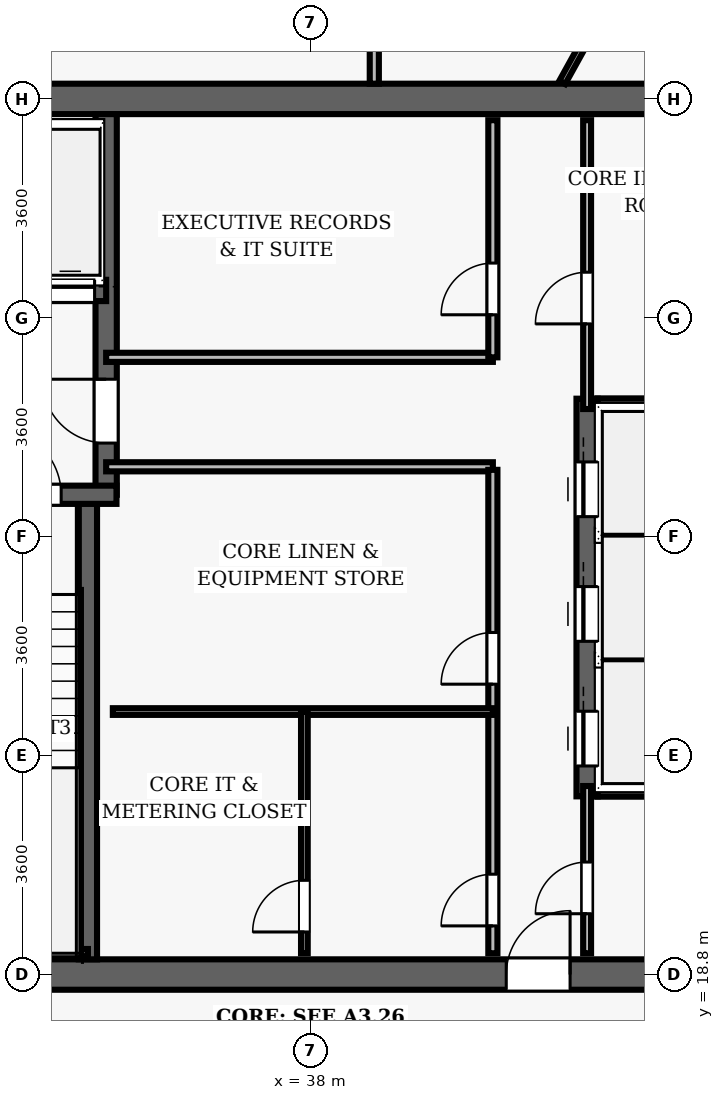
"""IFC4 building model, lengths in metres.
Left out: names, types, materials, properties, quantities, classifications, styles, units other than length and angle.
Written with IfcOpenShell. Run it as: python <this file> out.ifc"""

import sys

from ifc_helpers import new_model, si_unit, direction, frame, frame_2d, origin, place, context, subcontext, project, spatial, rectangle, extrude, element, fill, save


model = new_model("IFC4")
c1 = context("Model", 3, precision=1e-05, world=origin(), true_north=direction((0.0, 1.0)))
c2 = subcontext(c1, "Body", "Model", "MODEL_VIEW")
j1 = project(units=[si_unit("LENGTHUNIT", "METRE"), si_unit("PLANEANGLEUNIT", "RADIAN")], contexts=[c1])
p1 = place(None, origin())
s1 = spatial("IfcSite", under=j1, at=p1, CompositionType="ELEMENT")
p2 = place(p1, origin())
s2 = spatial("IfcBuilding", under=s1, at=p2, CompositionType="ELEMENT")
p3 = place(p2, frame((0.0, 0.0, 261.3)))
s3 = spatial("IfcBuildingStorey", under=s2, at=p3, CompositionType="ELEMENT", Elevation=261.3)
p4 = place(p3, frame((26.75, 18.8, 0.0), z_axis=(0.0, 0.0, 1.0), x_axis=(1.0, 0.0, 0.0)))
e1 = element("IfcWall", 1, at=p4, inside=s3, PredefinedType="SHEAR", context=c2, shape_type="SweptSolid", body=[
    extrude(rectangle(XDim=22.5, YDim=0.5, at=frame_2d((11.25, 0.0))), origin(), (0.0, 0.0, 1.0), 3.85),
])
p5 = place(p4, frame((14.47, 0.0, 0.0)))
e2 = element("IfcOpeningElement", 2, at=p5, cuts=e1, PredefinedType="OPENING", context=c2, shape_type="SweptSolid", body=[
    extrude(rectangle(XDim=1.05, YDim=2.15, at=frame_2d((0.525, 1.075))), frame((0.0, 0.26, 0.0), z_axis=(0.0, -1.0, 0.0), x_axis=(1.0, 0.0, 0.0)), (0.0, 0.0, 1.0), 0.52),
])
p6 = place(p3, frame((26.75, 33.2, 0.0), z_axis=(0.0, 0.0, 1.0), x_axis=(1.0, 0.0, 0.0)))
e3 = element("IfcWall", 3, at=p6, inside=s3, PredefinedType="SHEAR", context=c2, shape_type="SweptSolid", body=[
    extrude(rectangle(XDim=22.5, YDim=0.5, at=frame_2d((11.25, 0.0))), origin(), (0.0, 0.0, 1.0), 3.85),
])
p7 = place(p3, frame((34.34, 19.05, 0.0), z_axis=(0.0, 0.0, 1.0), x_axis=(0.0, 1.0, 0.0)))
e4 = element("IfcWall", 4, at=p7, inside=s3, PredefinedType="SHEAR", context=c2, shape_type="SweptSolid", body=[
    extrude(rectangle(XDim=7.5, YDim=0.3, at=frame_2d((3.75, 0.0))), origin(), (0.0, 0.0, 1.0), 3.85),
])
p8 = place(p3, frame((34.64, 26.69, 0.0), z_axis=(0.0, 0.0, 1.0), x_axis=(0.0, 1.0, 0.0)))
e5 = element("IfcWall", 5, at=p8, inside=s3, PredefinedType="SHEAR", context=c2, shape_type="SweptSolid", body=[
    extrude(rectangle(XDim=6.26, YDim=0.35, at=frame_2d((3.13, 0.0))), origin(), (0.0, 0.0, 1.0), 3.85),
])
p9 = place(p8, frame((0.85, 0.0, 0.0)))
e6 = element("IfcOpeningElement", 6, at=p9, cuts=e5, PredefinedType="OPENING", context=c2, shape_type="SweptSolid", body=[
    extrude(rectangle(XDim=1.05, YDim=2.15, at=frame_2d((0.525, 1.075))), frame((0.0, 0.185, 0.0), z_axis=(0.0, -1.0, 0.0), x_axis=(1.0, 0.0, 0.0)), (0.0, 0.0, 1.0), 0.37),
])
p10 = place(p3, frame((31.25, 26.69, 0.0), z_axis=(0.0, 0.0, 1.0), x_axis=(1.0, 0.0, 0.0)))
e7 = element("IfcWall", 7, at=p10, inside=s3, PredefinedType="SHEAR", context=c2, shape_type="SweptSolid", body=[
    extrude(rectangle(XDim=3.56, YDim=0.3, at=frame_2d((1.78, 0.0))), origin(), (0.0, 0.0, 1.0), 3.85),
])
p11 = place(p10, frame((1.55, 0.0, 0.0)))
e8 = element("IfcOpeningElement", 8, at=p11, cuts=e7, PredefinedType="OPENING", context=c2, shape_type="SweptSolid", body=[
    extrude(rectangle(XDim=1.1, YDim=2.15, at=frame_2d((0.55, 1.075))), frame((0.0, 0.16, 0.0), z_axis=(0.0, -1.0, 0.0), x_axis=(1.0, 0.0, 0.0)), (0.0, 0.0, 1.0), 0.32),
])
p12 = place(p3, frame((31.3, 19.16, 0.0), z_axis=(0.0, 0.0, 1.0), x_axis=(1.0, 0.0, 0.0)))
e9 = element("IfcWall", 9, at=p12, inside=s3, PredefinedType="SHEAR", context=c2, shape_type="SweptSolid", body=[
    extrude(rectangle(XDim=3.04, YDim=0.12, at=frame_2d((1.52, 0.0))), origin(), (0.0, 0.0, 1.0), 3.85),
])
p13 = place(p3, frame((32.23, 30.05, 0.0), z_axis=(0.0, 0.0, 1.0), x_axis=(1.0, 0.0, 0.0)))
e10 = element("IfcWall", 10, at=p13, inside=s3, PredefinedType="SHEAR", context=c2, shape_type="SweptSolid", body=[
    extrude(rectangle(XDim=2.41, YDim=0.35, at=frame_2d((1.205, 0.0))), origin(), (0.0, 0.0, 1.0), 3.04),
])
p14 = place(p13, frame((0.42, 0.0, 0.0)))
e11 = element("IfcOpeningElement", 11, at=p14, cuts=e10, PredefinedType="OPENING", context=c2, shape_type="SweptSolid", body=[
    extrude(rectangle(XDim=0.8, YDim=2.15, at=frame_2d((0.4, 1.075))), frame((0.0, 0.185, 0.0), z_axis=(0.0, -1.0, 0.0), x_axis=(1.0, 0.0, 0.0)), (0.0, 0.0, 1.0), 0.37),
])
p15 = place(p13, frame((1.42, 0.0, 0.0)))
e12 = element("IfcOpeningElement", 12, at=p15, cuts=e10, PredefinedType="OPENING", context=c2, shape_type="SweptSolid", body=[
    extrude(rectangle(XDim=0.8, YDim=2.15, at=frame_2d((0.4, 1.075))), frame((0.0, 0.185, 0.0), z_axis=(0.0, -1.0, 0.0), x_axis=(1.0, 0.0, 0.0)), (0.0, 0.0, 1.0), 0.37),
])
p16 = place(p3, frame((42.55, 21.73, 0.0), z_axis=(0.0, 0.0, 1.0), x_axis=(0.0, 1.0, 0.0)))
e13 = element("IfcWall", 13, at=p16, inside=s3, PredefinedType="SHEAR", context=c2, shape_type="SweptSolid", body=[
    extrude(rectangle(XDim=6.54, YDim=0.35, at=frame_2d((3.27, 0.0))), origin(), (0.0, 0.0, 1.0), 3.04),
])
p17 = place(p16, frame((0.5, 0.0, 0.0)))
e14 = element("IfcOpeningElement", 14, at=p17, cuts=e13, PredefinedType="OPENING", context=c2, shape_type="SweptSolid", body=[
    extrude(rectangle(XDim=0.9, YDim=2.15, at=frame_2d((0.45, 1.075))), frame((0.0, 0.185, 0.0), z_axis=(0.0, -1.0, 0.0), x_axis=(1.0, 0.0, 0.0)), (0.0, 0.0, 1.0), 0.37),
])
p18 = place(p16, frame((2.55, 0.0, 0.0)))
e15 = element("IfcOpeningElement", 15, at=p18, cuts=e13, PredefinedType="OPENING", context=c2, shape_type="SweptSolid", body=[
    extrude(rectangle(XDim=0.9, YDim=2.15, at=frame_2d((0.45, 1.075))), frame((0.0, 0.185, 0.0), z_axis=(0.0, -1.0, 0.0), x_axis=(1.0, 0.0, 0.0)), (0.0, 0.0, 1.0), 0.37),
])
p19 = place(p16, frame((4.6, 0.0, 0.0)))
e16 = element("IfcOpeningElement", 16, at=p19, cuts=e13, PredefinedType="OPENING", context=c2, shape_type="SweptSolid", body=[
    extrude(rectangle(XDim=0.9, YDim=2.15, at=frame_2d((0.45, 1.075))), frame((0.0, 0.185, 0.0), z_axis=(0.0, -1.0, 0.0), x_axis=(1.0, 0.0, 0.0)), (0.0, 0.0, 1.0), 0.37),
])
for number, where, z_axis, x_axis in (
    (17, (42.72, 21.9, 0.0), (0.0, 0.0, 1.0), (1.0, 0.0, 0.0)),
    (18, (42.72, 28.1, 0.0), (0.0, 0.0, 1.0), (1.0, 0.0, 0.0)),
):
    element("IfcWall", number, at=place(p3, frame(where, z_axis=z_axis, x_axis=x_axis)), inside=s3, PredefinedType="SHEAR", context=c2, shape_type="SweptSolid", body=[
        extrude(rectangle(XDim=2.03, YDim=0.35, at=frame_2d((1.015, 0.0))), origin(), (0.0, 0.0, 1.0), 3.04),
    ])
for number, where, z_axis, x_axis in (
    (19, (34.64, 27.15, 0.0), (0.0, 0.0, 1.0), (1.0, 0.0, 0.0)),
    (20, (34.64, 28.95, 0.0), (0.0, 0.0, 1.0), (1.0, 0.0, 0.0)),
):
    element("IfcWall", number, at=place(p3, frame(where, z_axis=z_axis, x_axis=x_axis)), inside=s3, PredefinedType="PARTITIONING", context=c2, shape_type="SweptSolid", body=[
        extrude(rectangle(XDim=6.36, YDim=0.15, at=frame_2d((3.18, 0.0))), origin(), (0.0, 0.0, 1.0), 3.04),
    ])
p20 = place(p3, frame((41.0, 28.95, 0.0), z_axis=(0.0, 0.0, 1.0), x_axis=(0.0, 1.0, 0.0)))
e21 = element("IfcWall", 21, at=p20, inside=s3, PredefinedType="PARTITIONING", context=c2, shape_type="SweptSolid", body=[
    extrude(rectangle(XDim=3.9, YDim=0.15, at=frame_2d((1.95, 0.0))), origin(), (0.0, 0.0, 1.0), 3.04),
])
p21 = place(p20, frame((0.7, 0.0, 0.0)))
e22 = element("IfcOpeningElement", 22, at=p21, cuts=e21, PredefinedType="OPENING", context=c2, shape_type="SweptSolid", body=[
    extrude(rectangle(XDim=0.85, YDim=2.1, at=frame_2d((0.425, 1.05))), frame((0.0, 0.085, 0.0), z_axis=(0.0, -1.0, 0.0), x_axis=(1.0, 0.0, 0.0)), (0.0, 0.0, 1.0), 0.17),
])
p22 = place(p3, frame((41.0, 19.15, 0.0), z_axis=(0.0, 0.0, 1.0), x_axis=(0.0, 1.0, 0.0)))
e23 = element("IfcWall", 23, at=p22, inside=s3, PredefinedType="PARTITIONING", context=c2, shape_type="SweptSolid", body=[
    extrude(rectangle(XDim=7.95, YDim=0.15, at=frame_2d((3.975, 0.0))), origin(), (0.0, 0.0, 1.0), 3.04),
])
p23 = place(p22, frame((4.425, 0.0, 0.0)))
e24 = element("IfcOpeningElement", 24, at=p23, cuts=e23, PredefinedType="OPENING", context=c2, shape_type="SweptSolid", body=[
    extrude(rectangle(XDim=0.85, YDim=2.1, at=frame_2d((0.425, 1.05))), frame((0.0, 0.085, 0.0), z_axis=(0.0, -1.0, 0.0), x_axis=(1.0, 0.0, 0.0)), (0.0, 0.0, 1.0), 0.17),
])
p24 = place(p22, frame((0.45, 0.0, 0.0)))
e25 = element("IfcOpeningElement", 25, at=p24, cuts=e23, PredefinedType="OPENING", context=c2, shape_type="SweptSolid", body=[
    extrude(rectangle(XDim=0.85, YDim=2.1, at=frame_2d((0.425, 1.05))), frame((0.0, 0.085, 0.0), z_axis=(0.0, -1.0, 0.0), x_axis=(1.0, 0.0, 0.0)), (0.0, 0.0, 1.0), 0.17),
])
p25 = place(p3, frame((34.75, 23.125, 0.0), z_axis=(0.0, 0.0, 1.0), x_axis=(1.0, 0.0, 0.0)))
e26 = element("IfcWall", 26, at=p25, inside=s3, PredefinedType="PARTITIONING", context=c2, shape_type="SweptSolid", body=[
    extrude(rectangle(XDim=6.25, YDim=0.11, at=frame_2d((3.125, 0.0))), origin(), (0.0, 0.0, 1.0), 3.04),
])
p26 = place(p3, frame((37.9, 19.15, 0.0), z_axis=(0.0, 0.0, 1.0), x_axis=(0.0, 1.0, 0.0)))
e27 = element("IfcWall", 27, at=p26, inside=s3, PredefinedType="PARTITIONING", context=c2, shape_type="SweptSolid", body=[
    extrude(rectangle(XDim=3.975, YDim=0.11, at=frame_2d((1.988, 0.0))), origin(), (0.0, 0.0, 1.0), 3.04),
])
p27 = place(p26, frame((0.35, 0.0, 0.0)))
e28 = element("IfcOpeningElement", 28, at=p27, cuts=e27, PredefinedType="OPENING", context=c2, shape_type="SweptSolid", body=[
    extrude(rectangle(XDim=0.85, YDim=2.1, at=frame_2d((0.425, 1.05))), frame((0.0, 0.065, 0.0), z_axis=(0.0, -1.0, 0.0), x_axis=(1.0, 0.0, 0.0)), (0.0, 0.0, 1.0), 0.13),
])
p28 = place(p3, frame((42.55, 28.1, 0.0), z_axis=(0.0, 0.0, 1.0), x_axis=(0.0, 1.0, 0.0)))
e29 = element("IfcWall", 29, at=p28, inside=s3, PredefinedType="PARTITIONING", context=c2, shape_type="SweptSolid", body=[
    extrude(rectangle(XDim=4.75, YDim=0.13, at=frame_2d((2.375, 0.0))), origin(), (0.0, 0.0, 1.0), 3.04),
])
p29 = place(p28, frame((1.4, 0.0, 0.0)))
e30 = element("IfcOpeningElement", 30, at=p29, cuts=e29, PredefinedType="OPENING", context=c2, shape_type="SweptSolid", body=[
    extrude(rectangle(XDim=0.85, YDim=2.1, at=frame_2d((0.425, 1.05))), frame((0.0, 0.075, 0.0), z_axis=(0.0, -1.0, 0.0), x_axis=(1.0, 0.0, 0.0)), (0.0, 0.0, 1.0), 0.15),
])
p30 = place(p3, frame((42.55, 19.15, 0.0), z_axis=(0.0, 0.0, 1.0), x_axis=(0.0, 1.0, 0.0)))
e31 = element("IfcWall", 31, at=p30, inside=s3, PredefinedType="PARTITIONING", context=c2, shape_type="SweptSolid", body=[
    extrude(rectangle(XDim=2.75, YDim=0.13, at=frame_2d((1.375, 0.0))), origin(), (0.0, 0.0, 1.0), 3.04),
])
p31 = place(p30, frame((0.65, 0.0, 0.0)))
e32 = element("IfcOpeningElement", 32, at=p31, cuts=e31, PredefinedType="OPENING", context=c2, shape_type="SweptSolid", body=[
    extrude(rectangle(XDim=0.85, YDim=2.1, at=frame_2d((0.425, 1.05))), frame((0.0, 0.075, 0.0), z_axis=(0.0, -1.0, 0.0), x_axis=(1.0, 0.0, 0.0)), (0.0, 0.0, 1.0), 0.15),
])
p32 = place(p3, frame((39.05, 33.45, 0.0), z_axis=(0.0, 0.0, 1.0), x_axis=(0.0, 1.0, 0.0)))
e33 = element("IfcWall", 33, at=p32, inside=s3, PredefinedType="PARTITIONING", context=c2, shape_type="SweptSolid", body=[
    extrude(rectangle(XDim=6.95, YDim=0.15, at=frame_2d((3.475, 0.0))), origin(), (0.0, 0.0, 1.0), 3.04),
])
p33 = place(p32, frame((1.262, 0.0, 0.0)))
e34 = element("IfcOpeningElement", 34, at=p33, cuts=e33, PredefinedType="OPENING", context=c2, shape_type="SweptSolid", body=[
    extrude(rectangle(XDim=0.95, YDim=2.15, at=frame_2d((0.475, 1.075))), frame((0.0, 0.085, 0.0), z_axis=(0.0, -1.0, 0.0), x_axis=(1.0, 0.0, 0.0)), (0.0, 0.0, 1.0), 0.17),
])
p34 = place(p3, frame((42.141, 33.47, 0.0), z_axis=(0.0, 0.0, 1.0), x_axis=(0.484812626369, 0.874618040812, 0.0)))
e35 = element("IfcWall", 35, at=p34, inside=s3, PredefinedType="PARTITIONING", context=c2, shape_type="SweptSolid", body=[
    extrude(rectangle(XDim=13.01, YDim=0.11, at=frame_2d((6.505, 0.0))), origin(), (0.0, 0.0, 1.0), 3.04),
])
p35 = place(p11, origin())
e36 = element("IfcDoor", 36, at=p35, inside=s3, OperationType="SINGLE_SWING_LEFT", PredefinedType="DOOR", context=c2, shape_type="SweptSolid", body=[
    extrude(rectangle(XDim=1.1, YDim=2.15, at=frame_2d((0.55, 1.075))), frame((0.0, 0.025, 0.0), z_axis=(0.0, -1.0, 0.0), x_axis=(1.0, 0.0, 0.0)), (0.0, 0.0, 1.0), 0.05),
])
fill(e8, e36)
p36 = place(p5, origin())
e37 = element("IfcDoor", 37, at=p36, inside=s3, OperationType="SINGLE_SWING_RIGHT", PredefinedType="DOOR", context=c2, shape_type="SweptSolid", body=[
    extrude(rectangle(XDim=1.05, YDim=2.15, at=frame_2d((0.525, 1.075))), frame((0.0, 0.025, 0.0), z_axis=(0.0, -1.0, 0.0), x_axis=(1.0, 0.0, 0.0)), (0.0, 0.0, 1.0), 0.05),
])
fill(e2, e37)
p37 = place(p9, origin())
e38 = element("IfcDoor", 38, at=p37, inside=s3, OperationType="SINGLE_SWING_RIGHT", PredefinedType="DOOR", context=c2, shape_type="SweptSolid", body=[
    extrude(rectangle(XDim=1.05, YDim=2.15, at=frame_2d((0.525, 1.075))), frame((0.0, 0.025, 0.0), z_axis=(0.0, -1.0, 0.0), x_axis=(1.0, 0.0, 0.0)), (0.0, 0.0, 1.0), 0.05),
])
fill(e6, e38)
p38 = place(p21, origin())
e39 = element("IfcDoor", 39, at=p38, inside=s3, OperationType="SINGLE_SWING_LEFT", PredefinedType="DOOR", context=c2, shape_type="SweptSolid", body=[
    extrude(rectangle(XDim=0.85, YDim=2.1, at=frame_2d((0.425, 1.05))), frame((0.0, 0.025, 0.0), z_axis=(0.0, -1.0, 0.0), x_axis=(1.0, 0.0, 0.0)), (0.0, 0.0, 1.0), 0.05),
])
fill(e22, e39)
p39 = place(p23, origin())
e40 = element("IfcDoor", 40, at=p39, inside=s3, OperationType="SINGLE_SWING_LEFT", PredefinedType="DOOR", context=c2, shape_type="SweptSolid", body=[
    extrude(rectangle(XDim=0.85, YDim=2.1, at=frame_2d((0.425, 1.05))), frame((0.0, 0.025, 0.0), z_axis=(0.0, -1.0, 0.0), x_axis=(1.0, 0.0, 0.0)), (0.0, 0.0, 1.0), 0.05),
])
fill(e24, e40)
p40 = place(p24, origin())
e41 = element("IfcDoor", 41, at=p40, inside=s3, OperationType="SINGLE_SWING_LEFT", PredefinedType="DOOR", context=c2, shape_type="SweptSolid", body=[
    extrude(rectangle(XDim=0.85, YDim=2.1, at=frame_2d((0.425, 1.05))), frame((0.0, 0.025, 0.0), z_axis=(0.0, -1.0, 0.0), x_axis=(1.0, 0.0, 0.0)), (0.0, 0.0, 1.0), 0.05),
])
fill(e25, e41)
p41 = place(p27, origin())
e42 = element("IfcDoor", 42, at=p41, inside=s3, OperationType="SINGLE_SWING_LEFT", PredefinedType="DOOR", context=c2, shape_type="SweptSolid", body=[
    extrude(rectangle(XDim=0.85, YDim=2.1, at=frame_2d((0.425, 1.05))), frame((0.0, 0.025, 0.0), z_axis=(0.0, -1.0, 0.0), x_axis=(1.0, 0.0, 0.0)), (0.0, 0.0, 1.0), 0.05),
])
fill(e28, e42)
p42 = place(p29, origin())
e43 = element("IfcDoor", 43, at=p42, inside=s3, OperationType="SINGLE_SWING_LEFT", PredefinedType="DOOR", context=c2, shape_type="SweptSolid", body=[
    extrude(rectangle(XDim=0.85, YDim=2.1, at=frame_2d((0.425, 1.05))), frame((0.0, 0.025, 0.0), z_axis=(0.0, -1.0, 0.0), x_axis=(1.0, 0.0, 0.0)), (0.0, 0.0, 1.0), 0.05),
])
fill(e30, e43)
p43 = place(p31, origin())
e44 = element("IfcDoor", 44, at=p43, inside=s3, OperationType="SINGLE_SWING_LEFT", PredefinedType="DOOR", context=c2, shape_type="SweptSolid", body=[
    extrude(rectangle(XDim=0.85, YDim=2.1, at=frame_2d((0.425, 1.05))), frame((0.0, 0.025, 0.0), z_axis=(0.0, -1.0, 0.0), x_axis=(1.0, 0.0, 0.0)), (0.0, 0.0, 1.0), 0.05),
])
fill(e32, e44)
p44 = place(p17, origin())
e45 = element("IfcDoor", 45, at=p44, inside=s3, OperationType="SLIDING_TO_LEFT", PredefinedType="DOOR", context=c2, shape_type="SweptSolid", body=[
    extrude(rectangle(XDim=0.9, YDim=2.15, at=frame_2d((0.45, 1.075))), frame((0.0, 0.025, 0.0), z_axis=(0.0, -1.0, 0.0), x_axis=(1.0, 0.0, 0.0)), (0.0, 0.0, 1.0), 0.05),
])
fill(e14, e45)
p45 = place(p18, origin())
e46 = element("IfcDoor", 46, at=p45, inside=s3, OperationType="SLIDING_TO_LEFT", PredefinedType="DOOR", context=c2, shape_type="SweptSolid", body=[
    extrude(rectangle(XDim=0.9, YDim=2.15, at=frame_2d((0.45, 1.075))), frame((0.0, 0.025, 0.0), z_axis=(0.0, -1.0, 0.0), x_axis=(1.0, 0.0, 0.0)), (0.0, 0.0, 1.0), 0.05),
])
fill(e15, e46)
p46 = place(p19, origin())
e47 = element("IfcDoor", 47, at=p46, inside=s3, OperationType="SLIDING_TO_LEFT", PredefinedType="DOOR", context=c2, shape_type="SweptSolid", body=[
    extrude(rectangle(XDim=0.9, YDim=2.15, at=frame_2d((0.45, 1.075))), frame((0.0, 0.025, 0.0), z_axis=(0.0, -1.0, 0.0), x_axis=(1.0, 0.0, 0.0)), (0.0, 0.0, 1.0), 0.05),
])
fill(e16, e47)
p47 = place(p15, origin())
e48 = element("IfcDoor", 48, at=p47, inside=s3, OperationType="SLIDING_TO_LEFT", PredefinedType="DOOR", context=c2, shape_type="SweptSolid", body=[
    extrude(rectangle(XDim=0.8, YDim=2.15, at=frame_2d((0.4, 1.075))), frame((0.0, 0.025, 0.0), z_axis=(0.0, -1.0, 0.0), x_axis=(1.0, 0.0, 0.0)), (0.0, 0.0, 1.0), 0.05),
])
fill(e12, e48)
save(model, sys.argv[1])
